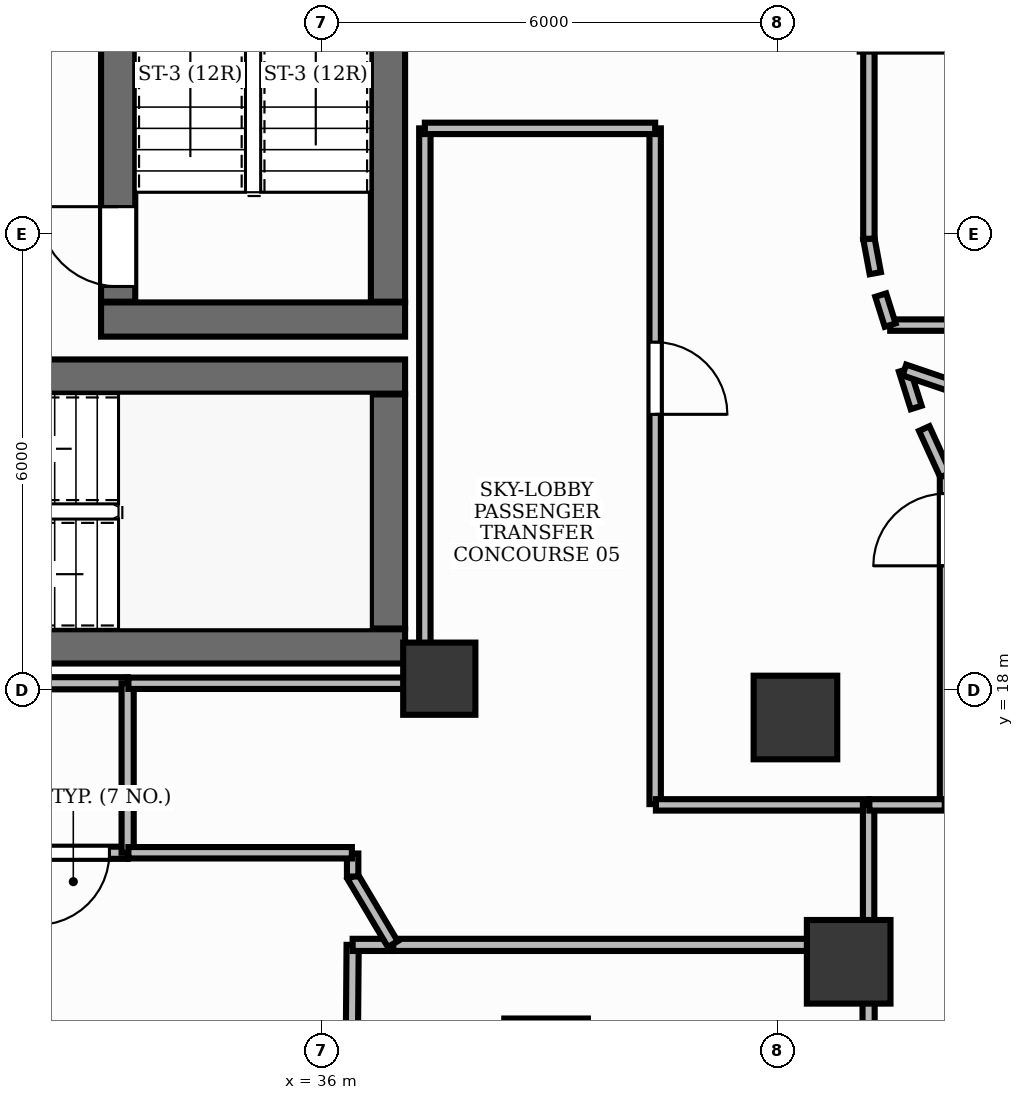
"""IFC4 building model, lengths in metres.
Left out: names, types, materials, properties, quantities, classifications, styles, units other than length and angle.
Written with IfcOpenShell. Run it as: python <this file> out.ifc"""

import sys

from ifc_helpers import new_model, si_unit, direction, frame, frame_2d, origin, origin_2d, place, context, subcontext, project, spatial, rectangle, extrude, element, fill, save


model = new_model("IFC4")
c1 = context("Model", 3, precision=1e-05, world=origin(), true_north=direction((0.0, 1.0)))
c2 = subcontext(c1, "Body", "Model", "MODEL_VIEW")
j1 = project(units=[si_unit("LENGTHUNIT", "METRE"), si_unit("PLANEANGLEUNIT", "RADIAN")], contexts=[c1])
p1 = place(None, origin())
s1 = spatial("IfcSite", under=j1, at=p1, CompositionType="ELEMENT")
p2 = place(p1, origin())
s2 = spatial("IfcBuilding", under=s1, at=p2, CompositionType="ELEMENT")
p3 = place(p2, frame((0.0, 0.0, 144.6)))
s3 = spatial("IfcBuildingStorey", under=s2, at=p3, CompositionType="ELEMENT", Elevation=144.6)
p4 = place(p3, frame((28.852, 18.575, 0.0), z_axis=(0.0, 0.0, 1.0), x_axis=(1.0, 0.0, 0.0)))
e1 = element("IfcWall", 1, at=p4, inside=s3, PredefinedType="SHEAR", context=c2, shape_type="SweptSolid", body=[
    extrude(rectangle(XDim=8.248, YDim=0.45, at=frame_2d((4.124, 0.0))), origin(), (0.0, 0.0, 1.0), 3.88),
])
p5 = place(p3, frame((28.35, 22.125, 0.0), z_axis=(0.0, 0.0, 1.0), x_axis=(1.0, 0.0, 0.0)))
e2 = element("IfcWall", 2, at=p5, inside=s3, PredefinedType="SHEAR", context=c2, shape_type="SweptSolid", body=[
    extrude(rectangle(XDim=8.75, YDim=0.45, at=frame_2d((4.375, 0.0))), origin(), (0.0, 0.0, 1.0), 3.88),
])
p6 = place(p3, frame((36.875, 18.81, 0.0), z_axis=(0.0, 0.0, 1.0), x_axis=(0.0, 1.0, 0.0)))
e3 = element("IfcWall", 3, at=p6, inside=s3, PredefinedType="SHEAR", context=c2, shape_type="SweptSolid", body=[
    extrude(rectangle(XDim=3.08, YDim=0.45, at=frame_2d((1.54, 0.0))), origin(), (0.0, 0.0, 1.0), 3.88),
])
p7 = place(p3, frame((33.1, 22.875, 0.0), z_axis=(0.0, 0.0, 1.0), x_axis=(1.0, 0.0, 0.0)))
e4 = element("IfcWall", 4, at=p7, inside=s3, PredefinedType="SHEAR", context=c2, shape_type="SweptSolid", body=[
    extrude(rectangle(XDim=4.0, YDim=0.45, at=frame_2d((2.0, 0.0))), origin(), (0.0, 0.0, 1.0), 3.88),
])
p8 = place(p3, frame((36.875, 23.11, 0.0), z_axis=(0.0, 0.0, 1.0), x_axis=(0.0, 1.0, 0.0)))
e5 = element("IfcWall", 5, at=p8, inside=s3, PredefinedType="SHEAR", context=c2, shape_type="SweptSolid", body=[
    extrude(rectangle(XDim=7.78, YDim=0.45, at=frame_2d((3.89, 0.0))), origin(), (0.0, 0.0, 1.0), 3.88),
])
p9 = place(p3, frame((33.325, 23.11, 0.0), z_axis=(0.0, 0.0, 1.0), x_axis=(0.0, 1.0, 0.0)))
e6 = element("IfcWall", 6, at=p9, inside=s3, PredefinedType="SHEAR", context=c2, shape_type="SweptSolid", body=[
    extrude(rectangle(XDim=7.78, YDim=0.45, at=frame_2d((3.89, 0.0))), origin(), (0.0, 0.0, 1.0), 3.88),
])
p10 = place(p9, frame((0.2, 0.0, 0.0)))
e7 = element("IfcOpeningElement", 7, at=p10, cuts=e6, PredefinedType="OPENING", context=c2, shape_type="SweptSolid", body=[
    extrude(rectangle(XDim=1.05, YDim=2.15, at=frame_2d((0.525, 1.075))), frame((0.0, 0.24, 0.0), z_axis=(0.0, -1.0, 0.0), x_axis=(1.0, 0.0, 0.0)), (0.0, 0.0, 1.0), 0.48),
])
p11 = place(p3, frame((37.55, 18.15, -0.0), z_axis=(0.0, 0.0, 1.0), x_axis=(1.0, 0.0, 0.0)))
e8 = element("IfcColumn", 8, at=p11, inside=s3, PredefinedType="PILASTER", context=c2, shape_type="SweptSolid", body=[
    extrude(rectangle(XDim=0.95, YDim=0.95, at=origin_2d()), origin(), (0.0, 0.0, 1.0), 3.881),
])
for number, where, z_axis, x_axis in (
    (9, (38.955, 13.129, -0.0), (0.0, 0.0, 1.0), (1.0, 0.0, 0.0)),
    (10, (42.936, 14.425, -0.0), (0.0, 0.0, 1.0), (1.0, 0.0, 0.0)),
    (11, (42.236, 17.639, -0.0), (0.0, 0.0, 1.0), (1.0, 0.0, 0.0)),
):
    element("IfcColumn", number, at=place(p3, frame(where, z_axis=z_axis, x_axis=x_axis)), inside=s3, PredefinedType="COLUMN", context=c2, shape_type="SweptSolid", body=[
        extrude(rectangle(XDim=1.1, YDim=1.1, at=origin_2d()), origin(), (0.0, 0.0, 1.0), 3.881),
    ])
p12 = place(p3, frame((33.45, 15.86, 0.0), z_axis=(0.0, 0.0, 1.0), x_axis=(-1.0, 0.0, 0.0)))
e12 = element("IfcWall", 12, at=p12, inside=s3, PredefinedType="PARTITIONING", context=c2, shape_type="SweptSolid", body=[
    extrude(rectangle(XDim=3.3, YDim=0.16, at=frame_2d((1.65, 0.0))), origin(), (0.0, 0.0, 1.0), 2.22),
])
p13 = place(p12, frame((0.24, 0.0, 0.0)))
e13 = element("IfcOpeningElement", 13, at=p13, cuts=e12, PredefinedType="OPENING", context=c2, shape_type="SweptSolid", body=[
    extrude(rectangle(XDim=0.95, YDim=2.15, at=frame_2d((0.475, 1.075))), frame((0.0, 0.095, 0.0), z_axis=(0.0, -1.0, 0.0), x_axis=(1.0, 0.0, 0.0)), (0.0, 0.0, 1.0), 0.19),
])
p14 = place(p3, frame((40.39, 25.39, 0.0), z_axis=(0.0, 0.0, 1.0), x_axis=(0.0, -1.0, 0.0)))
e14 = element("IfcWall", 14, at=p14, inside=s3, PredefinedType="PARTITIONING", context=c2, shape_type="SweptSolid", body=[
    extrude(rectangle(XDim=8.89, YDim=0.15, at=frame_2d((4.445, 0.0))), origin(), (0.0, 0.0, 1.0), 2.22),
])
p15 = place(p14, frame((2.812, 0.0, 0.0)))
e15 = element("IfcOpeningElement", 15, at=p15, cuts=e14, PredefinedType="OPENING", context=c2, shape_type="SweptSolid", body=[
    extrude(rectangle(XDim=0.95, YDim=2.15, at=frame_2d((0.475, 1.075))), frame((0.0, 0.09, 0.0), z_axis=(0.0, -1.0, 0.0), x_axis=(1.0, 0.0, 0.0)), (0.0, 0.0, 1.0), 0.18),
])
p16 = place(p3, frame((44.21, 16.5, 0.0), z_axis=(0.0, 0.0, 1.0), x_axis=(0.0, 1.0, 0.0)))
e16 = element("IfcWall", 16, at=p16, inside=s3, PredefinedType="PARTITIONING", context=c2, shape_type="SweptSolid", body=[
    extrude(rectangle(XDim=4.325, YDim=0.15, at=frame_2d((2.163, 0.0))), origin(), (0.0, 0.0, 1.0), 2.22),
])
p17 = place(p16, frame((3.135, 0.0, 0.0)))
e17 = element("IfcOpeningElement", 17, at=p17, cuts=e16, PredefinedType="OPENING", context=c2, shape_type="SweptSolid", body=[
    extrude(rectangle(XDim=0.95, YDim=2.15, at=frame_2d((0.475, 1.075))), frame((0.0, 0.09, 0.0), z_axis=(0.0, -1.0, 0.0), x_axis=(1.0, 0.0, 0.0)), (0.0, 0.0, 1.0), 0.18),
])
p18 = place(p3, frame((30.15, 18.09, 0.0), z_axis=(0.0, 0.0, 1.0), x_axis=(1.0, 0.0, 0.0)))
e18 = element("IfcWall", 18, at=p18, inside=s3, PredefinedType="PARTITIONING", context=c2, shape_type="SweptSolid", body=[
    extrude(rectangle(XDim=3.3, YDim=0.16, at=frame_2d((1.65, 0.0))), origin(), (0.0, 0.0, 1.0), 2.22),
])
p19 = place(p3, frame((33.45, 18.09, 0.0), z_axis=(0.0, 0.0, 1.0), x_axis=(0.0, -1.0, 0.0)))
e19 = element("IfcWall", 19, at=p19, inside=s3, PredefinedType="PARTITIONING", context=c2, shape_type="SweptSolid", body=[
    extrude(rectangle(XDim=2.23, YDim=0.16, at=frame_2d((1.115, 0.0))), origin(), (0.0, 0.0, 1.0), 2.22),
])
p20 = place(p3, frame((36.944, 14.648, 0.0), z_axis=(0.0, 0.0, 1.0), x_axis=(1.0, 0.0, 0.0)))
e20 = element("IfcWall", 20, at=p20, inside=s3, PredefinedType="PARTITIONING", context=c2, shape_type="SweptSolid", body=[
    extrude(rectangle(XDim=6.254, YDim=0.16, at=frame_2d((3.127, 0.0))), origin(), (0.0, 0.0, 1.0), 2.22),
])
p21 = place(p3, frame((43.198, 14.648, 0.0), z_axis=(0.0, 0.0, 1.0), x_axis=(0.0, -1.0, 0.0)))
e21 = element("IfcWall", 21, at=p21, inside=s3, PredefinedType="PARTITIONING", context=c2, shape_type="SweptSolid", body=[
    extrude(rectangle(XDim=8.457, YDim=0.16, at=frame_2d((4.229, 0.0))), origin(), (0.0, 0.0, 1.0), 2.22),
])
p22 = place(p3, frame((36.4, 13.4, 0.0), z_axis=(0.0, 0.0, 1.0), x_axis=(0.008020086342, 0.99996783859, 0.0)))
e22 = element("IfcWall", 22, at=p22, inside=s3, PredefinedType="PARTITIONING", context=c2, shape_type="SweptSolid", body=[
    extrude(rectangle(XDim=1.248, YDim=0.16, at=frame_2d((0.624, 0.0))), origin(), (0.0, 0.0, 1.0), 2.22),
])
p23 = place(p3, frame((36.41, 14.648, 0.0), z_axis=(0.0, 0.0, 1.0), x_axis=(1.0, 0.0, 0.0)))
e23 = element("IfcWall", 23, at=p23, inside=s3, PredefinedType="PARTITIONING", context=c2, shape_type="SweptSolid", body=[
    extrude(rectangle(XDim=0.53, YDim=0.16, at=frame_2d((0.265, 0.0))), origin(), (0.0, 0.0, 1.0), 2.22),
])
p24 = place(p3, frame((36.938, 14.658, 0.0), z_axis=(0.0, 0.0, 1.0), x_axis=(-0.510604172379, 0.859815898405, 0.0)))
e24 = element("IfcWall", 24, at=p24, inside=s3, PredefinedType="PARTITIONING", context=c2, shape_type="SweptSolid", body=[
    extrude(rectangle(XDim=1.035, YDim=0.15, at=frame_2d((0.517, 0.0))), origin(), (0.0, 0.0, 1.0), 2.22),
])
p25 = place(p3, frame((36.41, 15.548, 0.0), z_axis=(0.0, 0.0, 1.0), x_axis=(0.0, 1.0, 0.0)))
e25 = element("IfcWall", 25, at=p25, inside=s3, PredefinedType="PARTITIONING", context=c2, shape_type="SweptSolid", body=[
    extrude(rectangle(XDim=0.302, YDim=0.15, at=frame_2d((0.151, 0.0))), origin(), (0.0, 0.0, 1.0), 2.22),
])
p26 = place(p3, frame((36.4, 15.86, 0.0), z_axis=(0.0, 0.0, 1.0), x_axis=(-1.0, 0.0, 0.0)))
e26 = element("IfcWall", 26, at=p26, inside=s3, PredefinedType="PARTITIONING", context=c2, shape_type="SweptSolid", body=[
    extrude(rectangle(XDim=2.94, YDim=0.15, at=frame_2d((1.47, 0.0))), origin(), (0.0, 0.0, 1.0), 2.22),
])
p27 = place(p3, frame((33.46, 18.09, 0.0), z_axis=(0.0, 0.0, 1.0), x_axis=(1.0, 0.0, 0.0)))
e27 = element("IfcWall", 27, at=p27, inside=s3, PredefinedType="PARTITIONING", context=c2, shape_type="SweptSolid", body=[
    extrude(rectangle(XDim=3.89, YDim=0.15, at=frame_2d((1.945, 0.0))), origin(), (0.0, 0.0, 1.0), 2.22),
])
p28 = place(p3, frame((37.36, 18.1, 0.0), z_axis=(0.0, 0.0, 1.0), x_axis=(0.0, 1.0, 0.0)))
e28 = element("IfcWall", 28, at=p28, inside=s3, PredefinedType="PARTITIONING", context=c2, shape_type="SweptSolid", body=[
    extrude(rectangle(XDim=7.29, YDim=0.15, at=frame_2d((3.645, 0.0))), origin(), (0.0, 0.0, 1.0), 2.22),
])
p29 = place(p3, frame((37.36, 25.39, 0.0), z_axis=(0.0, 0.0, 1.0), x_axis=(1.0, 0.0, 0.0)))
e29 = element("IfcWall", 29, at=p29, inside=s3, PredefinedType="PARTITIONING", context=c2, shape_type="SweptSolid", body=[
    extrude(rectangle(XDim=3.03, YDim=0.15, at=frame_2d((1.515, 0.0))), origin(), (0.0, 0.0, 1.0), 2.22),
])
p30 = place(p3, frame((40.4, 16.49, 0.0), z_axis=(0.0, 0.0, 1.0), x_axis=(1.0, 0.0, 0.0)))
e30 = element("IfcWall", 30, at=p30, inside=s3, PredefinedType="PARTITIONING", context=c2, shape_type="SweptSolid", body=[
    extrude(rectangle(XDim=2.798, YDim=0.15, at=frame_2d((1.399, 0.0))), origin(), (0.0, 0.0, 1.0), 2.22),
])
p31 = place(p3, frame((43.198, 16.49, 0.0), z_axis=(0.0, 0.0, 1.0), x_axis=(0.0, -1.0, 0.0)))
e31 = element("IfcWall", 31, at=p31, inside=s3, PredefinedType="PARTITIONING", context=c2, shape_type="SweptSolid", body=[
    extrude(rectangle(XDim=1.832, YDim=0.15, at=frame_2d((0.916, 0.0))), origin(), (0.0, 0.0, 1.0), 2.22),
])
p32 = place(p3, frame((43.208, 16.49, 0.0), z_axis=(0.0, 0.0, 1.0), x_axis=(1.0, 0.0, 0.0)))
e32 = element("IfcWall", 32, at=p32, inside=s3, PredefinedType="PARTITIONING", context=c2, shape_type="SweptSolid", body=[
    extrude(rectangle(XDim=0.992, YDim=0.15, at=frame_2d((0.496, 0.0))), origin(), (0.0, 0.0, 1.0), 2.22),
])
p33 = place(p3, frame((44.209, 20.829, 0.0), z_axis=(0.0, 0.0, 1.0), x_axis=(-0.414377467152, 0.910105111905, 0.0)))
e33 = element("IfcWall", 33, at=p33, inside=s3, PredefinedType="PARTITIONING", context=c2, shape_type="SweptSolid", body=[
    extrude(rectangle(XDim=0.672, YDim=0.15, at=frame_2d((0.336, 0.0))), origin(), (0.0, 0.0, 1.0), 2.22),
])
p34 = place(p3, frame((43.824, 21.718, 0.0), z_axis=(0.0, 0.0, 1.0), x_axis=(-0.300747217066, 0.953703890852, 0.0)))
e34 = element("IfcWall", 34, at=p34, inside=s3, PredefinedType="PARTITIONING", context=c2, shape_type="SweptSolid", body=[
    extrude(rectangle(XDim=0.517, YDim=0.15, at=frame_2d((0.259, 0.0))), origin(), (0.0, 0.0, 1.0), 2.22),
])
p35 = place(p3, frame((43.668, 22.211, 0.0), z_axis=(0.0, 0.0, 1.0), x_axis=(0.946663200968, -0.322224741342, 0.0)))
e35 = element("IfcWall", 35, at=p35, inside=s3, PredefinedType="PARTITIONING", context=c2, shape_type="SweptSolid", body=[
    extrude(rectangle(XDim=3.099, YDim=0.15, at=frame_2d((1.549, 0.0))), origin(), (0.0, 0.0, 1.0), 2.22),
])
p36 = place(p3, frame((45.996, 22.802, 0.0), z_axis=(0.0, 0.0, 1.0), x_axis=(-1.0, 0.0, 0.0)))
e36 = element("IfcWall", 36, at=p36, inside=s3, PredefinedType="PARTITIONING", context=c2, shape_type="SweptSolid", body=[
    extrude(rectangle(XDim=2.514, YDim=0.15, at=frame_2d((1.257, 0.0))), origin(), (0.0, 0.0, 1.0), 2.22),
])
p37 = place(p3, frame((43.482, 22.802, 0.0), z_axis=(0.0, 0.0, 1.0), x_axis=(-0.300425095419, 0.953805410995, 0.0)))
e37 = element("IfcWall", 37, at=p37, inside=s3, PredefinedType="PARTITIONING", context=c2, shape_type="SweptSolid", body=[
    extrude(rectangle(XDim=0.414, YDim=0.15, at=frame_2d((0.207, 0.0))), origin(), (0.0, 0.0, 1.0), 2.22),
])
p38 = place(p3, frame((43.286, 23.485, 0.0), z_axis=(0.0, 0.0, 1.0), x_axis=(-0.182241022482, 0.983253888741, 0.0)))
e38 = element("IfcWall", 38, at=p38, inside=s3, PredefinedType="PARTITIONING", context=c2, shape_type="SweptSolid", body=[
    extrude(rectangle(XDim=0.461, YDim=0.15, at=frame_2d((0.23, 0.0))), origin(), (0.0, 0.0, 1.0), 2.22),
])
p39 = place(p3, frame((43.202, 23.938, 0.0), z_axis=(0.0, 0.0, 1.0), x_axis=(0.0, 1.0, 0.0)))
e39 = element("IfcWall", 39, at=p39, inside=s3, PredefinedType="PARTITIONING", context=c2, shape_type="SweptSolid", body=[
    extrude(rectangle(XDim=3.226, YDim=0.15, at=frame_2d((1.613, 0.0))), origin(), (0.0, 0.0, 1.0), 2.22),
])
p40 = place(p10, origin())
e40 = element("IfcDoor", 40, at=p40, inside=s3, OperationType="SINGLE_SWING_RIGHT", PredefinedType="DOOR", context=c2, shape_type="SweptSolid", body=[
    extrude(rectangle(XDim=1.05, YDim=2.15, at=frame_2d((0.525, 1.075))), frame((0.0, 0.025, 0.0), z_axis=(0.0, -1.0, 0.0), x_axis=(1.0, 0.0, 0.0)), (0.0, 0.0, 1.0), 0.05),
])
fill(e7, e40)
p41 = place(p13, origin())
e41 = element("IfcDoor", 41, at=p41, inside=s3, OperationType="SINGLE_SWING_RIGHT", PredefinedType="DOOR", context=c2, shape_type="SweptSolid", body=[
    extrude(rectangle(XDim=0.95, YDim=2.15, at=frame_2d((0.475, 1.075))), frame((0.0, 0.025, 0.0), z_axis=(0.0, -1.0, 0.0), x_axis=(1.0, 0.0, 0.0)), (0.0, 0.0, 1.0), 0.05),
])
fill(e13, e41)
p42 = place(p15, origin())
e42 = element("IfcDoor", 42, at=p42, inside=s3, OperationType="SINGLE_SWING_RIGHT", PredefinedType="DOOR", context=c2, shape_type="SweptSolid", body=[
    extrude(rectangle(XDim=0.95, YDim=2.15, at=frame_2d((0.475, 1.075))), frame((0.0, 0.025, 0.0), z_axis=(0.0, -1.0, 0.0), x_axis=(1.0, 0.0, 0.0)), (0.0, 0.0, 1.0), 0.05),
])
fill(e15, e42)
p43 = place(p17, origin())
e43 = element("IfcDoor", 43, at=p43, inside=s3, OperationType="SINGLE_SWING_LEFT", PredefinedType="DOOR", context=c2, shape_type="SweptSolid", body=[
    extrude(rectangle(XDim=0.95, YDim=2.15, at=frame_2d((0.475, 1.075))), frame((0.0, 0.025, 0.0), z_axis=(0.0, -1.0, 0.0), x_axis=(1.0, 0.0, 0.0)), (0.0, 0.0, 1.0), 0.05),
])
fill(e17, e43)
save(model, sys.argv[1])
